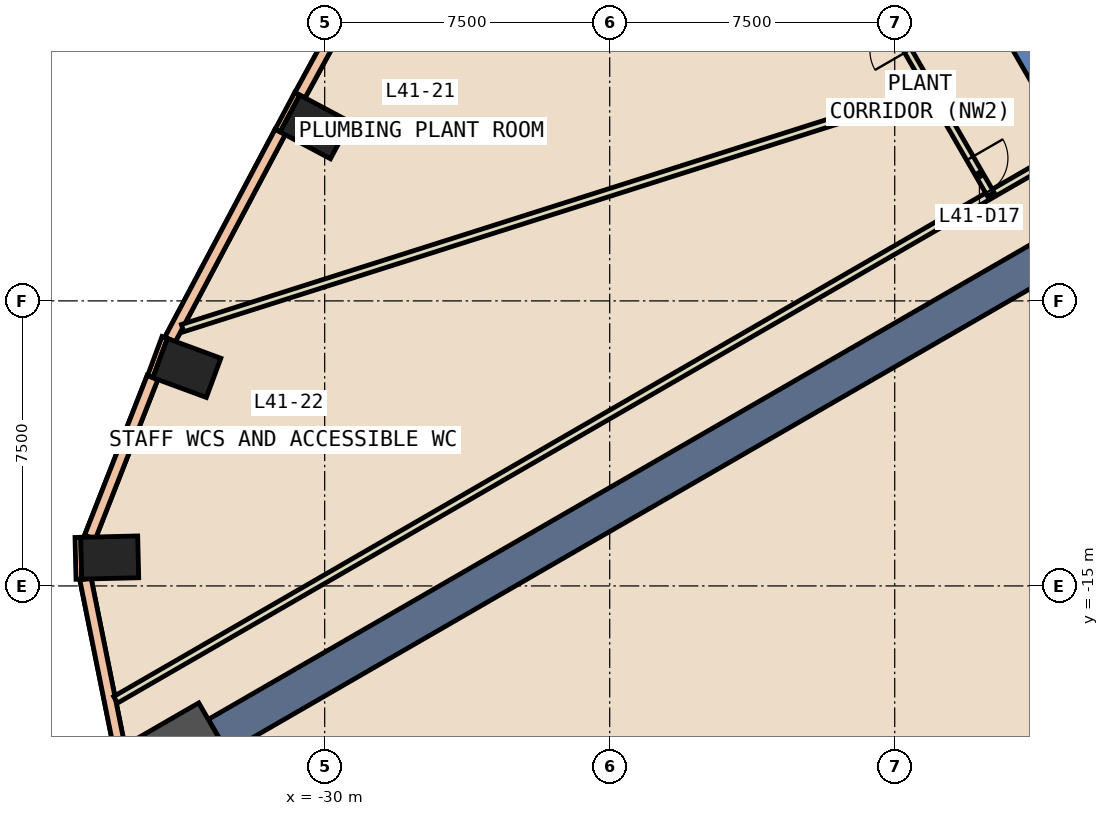
"""IFC4 building model, lengths in metres.
Left out: names, types, materials, properties, quantities, classifications, styles, units other than length and angle.
Written with IfcOpenShell. Run it as: python <this file> out.ifc"""

import sys

from ifc_helpers import new_model, si_unit, direction, frame, frame_2d, origin, origin_2d, place, context, subcontext, project, spatial, polyline, rectangle, outline, extrude, element, fill, save


model = new_model("IFC4")
c1 = context("Model", 3, precision=1e-05, world=origin(), true_north=direction((0.0, 1.0)))
c2 = subcontext(c1, "Body", "Model", "MODEL_VIEW")
j1 = project(units=[si_unit("LENGTHUNIT", "METRE"), si_unit("PLANEANGLEUNIT", "RADIAN")], contexts=[c1])
p1 = place(None, origin())
s1 = spatial("IfcSite", under=j1, at=p1, CompositionType="ELEMENT")
p2 = place(p1, origin())
s2 = spatial("IfcBuilding", under=s1, at=p2, CompositionType="ELEMENT")
p3 = place(p2, frame((0.0, 0.0, 184.4)))
s3 = spatial("IfcBuildingStorey", under=s2, at=p3, CompositionType="ELEMENT", Elevation=184.4)
for number, where, z_axis, x_axis in (
    (1, (-30.252, -2.922, -0.6), (0.0, 0.0, 1.0), (0.47, 0.883, 0.0)),
    (2, (-33.627, -9.265, -0.6), (0.0, 0.0, 1.0), (0.347, 0.938, 0.0)),
    (3, (-35.657, -14.253, -0.6), (0.0, 0.0, 1.0), (-0.024, 1.0, 0.0)),
):
    element("IfcColumn", number, at=place(p3, frame(where, z_axis=z_axis, x_axis=x_axis)), inside=s3, PredefinedType="COLUMN", context=c2, shape_type="SweptSolid", body=[
        extrude(rectangle(XDim=1.1, YDim=1.5, at=origin_2d()), origin(), (0.0, 0.0, 1.0), 5.4),
    ])
p4 = place(p3, frame((-33.68, -19.444, -0.6), z_axis=(0.0, 0.0, 1.0), x_axis=(0.866025403784, 0.5, 0.0)))
e4 = element("IfcColumn", 4, at=p4, inside=s3, PredefinedType="COLUMN", context=c2, shape_type="SweptSolid", body=[
    extrude(rectangle(XDim=2.0, YDim=2.0, at=origin_2d()), origin(), (0.0, 0.0, 1.0), 5.4),
])
p5 = place(p3, frame((0.0, 0.0, -0.6)))
e5 = element("IfcWall", 5, at=p5, inside=s3, PredefinedType="SHEAR", context=c2, shape_type="SweptSolid", body=[
    extrude(outline(polyline([(-11.367, -1.811), (-10.328, -1.211), (-10.978, -0.086), (-12.017, -0.686), (-11.367, -1.811)])), origin(), (0.0, 0.0, 1.0), 5.4),
])
p6 = place(p3, frame((-9.31, -5.375, 0.0), z_axis=(0.0, 0.0, 1.0), x_axis=(-0.866015103238, -0.500017840646, 0.0)))
e6 = element("IfcWall", 6, at=p6, inside=s3, PredefinedType="SHEAR", context=c2, shape_type="SweptSolid", body=[
    extrude(rectangle(XDim=27.139, YDim=1.0, at=frame_2d((13.57, 0.0))), origin(), (0.0, 0.0, 1.0), 4.8),
])
p7 = place(p3, frame((-30.721, -2.049, 0.0), z_axis=(0.0, 0.0, 1.0), x_axis=(-0.470058271093, -0.88263538439, 0.0)))
e7 = element("IfcWall", 7, at=p7, inside=s3, PredefinedType="STANDARD", context=c2, shape_type="SweptSolid", body=[
    extrude(rectangle(XDim=1.1, YDim=0.15, at=frame_2d((0.55, 0.0))), origin(), (0.0, 0.0, 1.0), 4.8),
])
for number, where, z_axis, x_axis in (
    (8, (-34.21, -8.463, 0.0), (0.0, 0.0, 1.0), (-0.346, -0.938, 0.0)),
    (9, (-36.495, -13.723, 0.0), (0.0, 0.0, 1.0), (0.024, -1.0, 0.0)),
):
    element("IfcWall", number, at=place(p3, frame(where, z_axis=z_axis, x_axis=x_axis)), inside=s3, PredefinedType="STANDARD", context=c2, shape_type="SweptSolid", body=[
        extrude(rectangle(XDim=1.1, YDim=0.15, at=frame_2d((0.55, 0.0))), origin(), (0.0, 0.0, 1.0), 4.8),
    ])
p8 = place(p3, frame((-27.786, 3.158, 0.0), z_axis=(0.0, 0.0, 1.0), x_axis=(-0.479192671498, -0.87770973766, 0.0)))
e10 = element("IfcWall", 10, at=p8, inside=s3, PredefinedType="STANDARD", context=c2, shape_type="SweptSolid", body=[
    extrude(rectangle(XDim=5.977, YDim=0.3, at=frame_2d((2.988, 0.0))), origin(), (0.0, 0.0, 1.0), 1.2),
])
p9 = place(p3, frame((-27.786, 3.158, 4.0), z_axis=(0.0, 0.0, 1.0), x_axis=(-0.479192671498, -0.87770973766, 0.0)))
e11 = element("IfcWall", 11, at=p9, inside=s3, PredefinedType="STANDARD", context=c2, shape_type="SweptSolid", body=[
    extrude(rectangle(XDim=5.977, YDim=0.3, at=frame_2d((2.988, 0.0))), origin(), (0.0, 0.0, 1.0), 0.8),
])
p10 = place(p3, frame((-31.171, -3.054, 0.0), z_axis=(0.0, 0.0, 1.0), x_axis=(-0.468703860557, -0.883355359467, 0.0)))
e12 = element("IfcWall", 12, at=p10, inside=s3, PredefinedType="STANDARD", context=c2, shape_type="SweptSolid", body=[
    extrude(rectangle(XDim=6.183, YDim=0.3, at=frame_2d((3.092, 0.0))), origin(), (0.0, 0.0, 1.0), 1.2),
])
p11 = place(p3, frame((-31.171, -3.054, 4.0), z_axis=(0.0, 0.0, 1.0), x_axis=(-0.468703860557, -0.883355359467, 0.0)))
e13 = element("IfcWall", 13, at=p11, inside=s3, PredefinedType="STANDARD", context=c2, shape_type="SweptSolid", body=[
    extrude(rectangle(XDim=6.183, YDim=0.3, at=frame_2d((3.092, 0.0))), origin(), (0.0, 0.0, 1.0), 0.8),
])
p12 = place(p3, frame((-34.531, -9.516, 0.0), z_axis=(0.0, 0.0, 1.0), x_axis=(-0.364813480186, -0.931080622006, 0.0)))
e14 = element("IfcWall", 14, at=p12, inside=s3, PredefinedType="STANDARD", context=c2, shape_type="SweptSolid", body=[
    extrude(rectangle(XDim=4.512, YDim=0.3, at=frame_2d((2.256, 0.0))), origin(), (0.0, 0.0, 1.0), 1.2),
])
p13 = place(p3, frame((-34.531, -9.516, 4.0), z_axis=(0.0, 0.0, 1.0), x_axis=(-0.364813480186, -0.931080622006, 0.0)))
e15 = element("IfcWall", 15, at=p13, inside=s3, PredefinedType="STANDARD", context=c2, shape_type="SweptSolid", body=[
    extrude(rectangle(XDim=4.512, YDim=0.3, at=frame_2d((2.256, 0.0))), origin(), (0.0, 0.0, 1.0), 0.8),
])
p14 = place(p3, frame((-36.295, -14.818, 0.0), z_axis=(0.0, 0.0, 1.0), x_axis=(0.197466415614, -0.980309652459, 0.0)))
e16 = element("IfcWall", 16, at=p14, inside=s3, PredefinedType="STANDARD", context=c2, shape_type="SweptSolid", body=[
    extrude(rectangle(XDim=4.659, YDim=0.3, at=frame_2d((2.329, 0.0))), origin(), (0.0, 0.0, 1.0), 1.2),
])
p15 = place(p3, frame((-36.295, -14.818, 4.0), z_axis=(0.0, 0.0, 1.0), x_axis=(0.197466415614, -0.980309652459, 0.0)))
e17 = element("IfcWall", 17, at=p15, inside=s3, PredefinedType="STANDARD", context=c2, shape_type="SweptSolid", body=[
    extrude(rectangle(XDim=4.659, YDim=0.3, at=frame_2d((2.329, 0.0))), origin(), (0.0, 0.0, 1.0), 0.8),
])
p16 = place(p3, frame((-7.606, -12.836, 0.0), z_axis=(0.0, 0.0, 1.0), x_axis=(-0.444256696047, -0.895899541253, 0.0)))
e18 = element("IfcWall", 18, at=p16, inside=s3, PredefinedType="PARTITIONING", context=c2, shape_type="SweptSolid", body=[
    extrude(rectangle(XDim=13.916, YDim=0.2, at=frame_2d((6.958, 0.0))), origin(), (0.0, 0.0, 1.0), 4.8),
])
p17 = place(p3, frame((-35.502, -17.996, 0.0), z_axis=(0.0, 0.0, 1.0), x_axis=(0.866041720547, 0.499971737474, 0.0)))
e19 = element("IfcWall", 19, at=p17, inside=s3, PredefinedType="PARTITIONING", context=c2, shape_type="SweptSolid", body=[
    extrude(rectangle(XDim=28.994, YDim=0.2, at=frame_2d((14.497, 0.0))), origin(), (0.0, 0.0, 1.0), 4.8),
])
p18 = place(p3, frame((-14.001, -2.05, 0.0), z_axis=(0.0, 0.0, 1.0), x_axis=(-0.499844057801, 0.866115418337, 0.0)))
e20 = element("IfcWall", 20, at=p18, inside=s3, PredefinedType="PARTITIONING", context=c2, shape_type="SweptSolid", body=[
    extrude(rectangle(XDim=2.665, YDim=0.2, at=frame_2d((1.333, 0.0))), origin(), (0.0, 0.0, 1.0), 2.4),
])
p19 = place(p18, frame((1.301, 0.0, 0.0)))
e21 = element("IfcOpeningElement", 21, at=p19, cuts=e20, PredefinedType="OPENING", context=c2, shape_type="SweptSolid", body=[
    extrude(rectangle(XDim=1.0, YDim=2.1, at=frame_2d((0.5, 1.05))), frame((0.0, 0.11, 0.0), z_axis=(0.0, -1.0, 0.0), x_axis=(1.0, 0.0, 0.0)), (0.0, 0.0, 1.0), 0.22),
])
p20 = place(p3, frame((-14.001, -2.05, 0.0), z_axis=(0.0, 0.0, 1.0), x_axis=(0.500026340207, -0.866010195725, 0.0)))
e22 = element("IfcWall", 22, at=p20, inside=s3, PredefinedType="PARTITIONING", context=c2, shape_type="SweptSolid", body=[
    extrude(rectangle(XDim=3.06, YDim=0.2, at=frame_2d((1.53, 0.0))), origin(), (0.0, 0.0, 1.0), 4.8),
])
p21 = place(p20, frame((1.96, 0.0, 0.0)))
e23 = element("IfcOpeningElement", 23, at=p21, cuts=e22, PredefinedType="OPENING", context=c2, shape_type="SweptSolid", body=[
    extrude(rectangle(XDim=1.0, YDim=2.1, at=frame_2d((0.5, 1.05))), frame((0.0, 0.11, 0.0), z_axis=(0.0, -1.0, 0.0), x_axis=(1.0, 0.0, 0.0)), (0.0, 0.0, 1.0), 0.22),
])
p22 = place(p3, frame((-14.051, -1.963, 0.0), z_axis=(0.0, 0.0, 1.0), x_axis=(-0.953023422208, -0.302896610617, 0.0)))
e24 = element("IfcWall", 24, at=p22, inside=s3, PredefinedType="PARTITIONING", context=c2, shape_type="SweptSolid", body=[
    extrude(rectangle(XDim=1.641, YDim=0.2, at=frame_2d((0.821, 0.0))), origin(), (0.0, 0.0, 1.0), 2.4),
])
p23 = place(p3, frame((-15.615, -2.46, 0.0), z_axis=(0.0, 0.0, 1.0), x_axis=(-0.953081770848, -0.30271296318, 0.0)))
e25 = element("IfcWall", 25, at=p23, inside=s3, PredefinedType="PARTITIONING", context=c2, shape_type="SweptSolid", body=[
    extrude(rectangle(XDim=19.018, YDim=0.2, at=frame_2d((9.509, 0.0))), origin(), (0.0, 0.0, 1.0), 4.8),
])
p24 = place(p21, origin())
e26 = element("IfcDoor", 26, at=p24, inside=s3, OperationType="SINGLE_SWING_LEFT", PredefinedType="DOOR", context=c2, shape_type="SweptSolid", body=[
    extrude(rectangle(XDim=1.0, YDim=2.1, at=frame_2d((0.5, 1.05))), frame((0.0, 0.025, 0.0), z_axis=(0.0, -1.0, 0.0), x_axis=(1.0, 0.0, 0.0)), (0.0, 0.0, 1.0), 0.05),
])
fill(e23, e26)
save(model, sys.argv[1])
